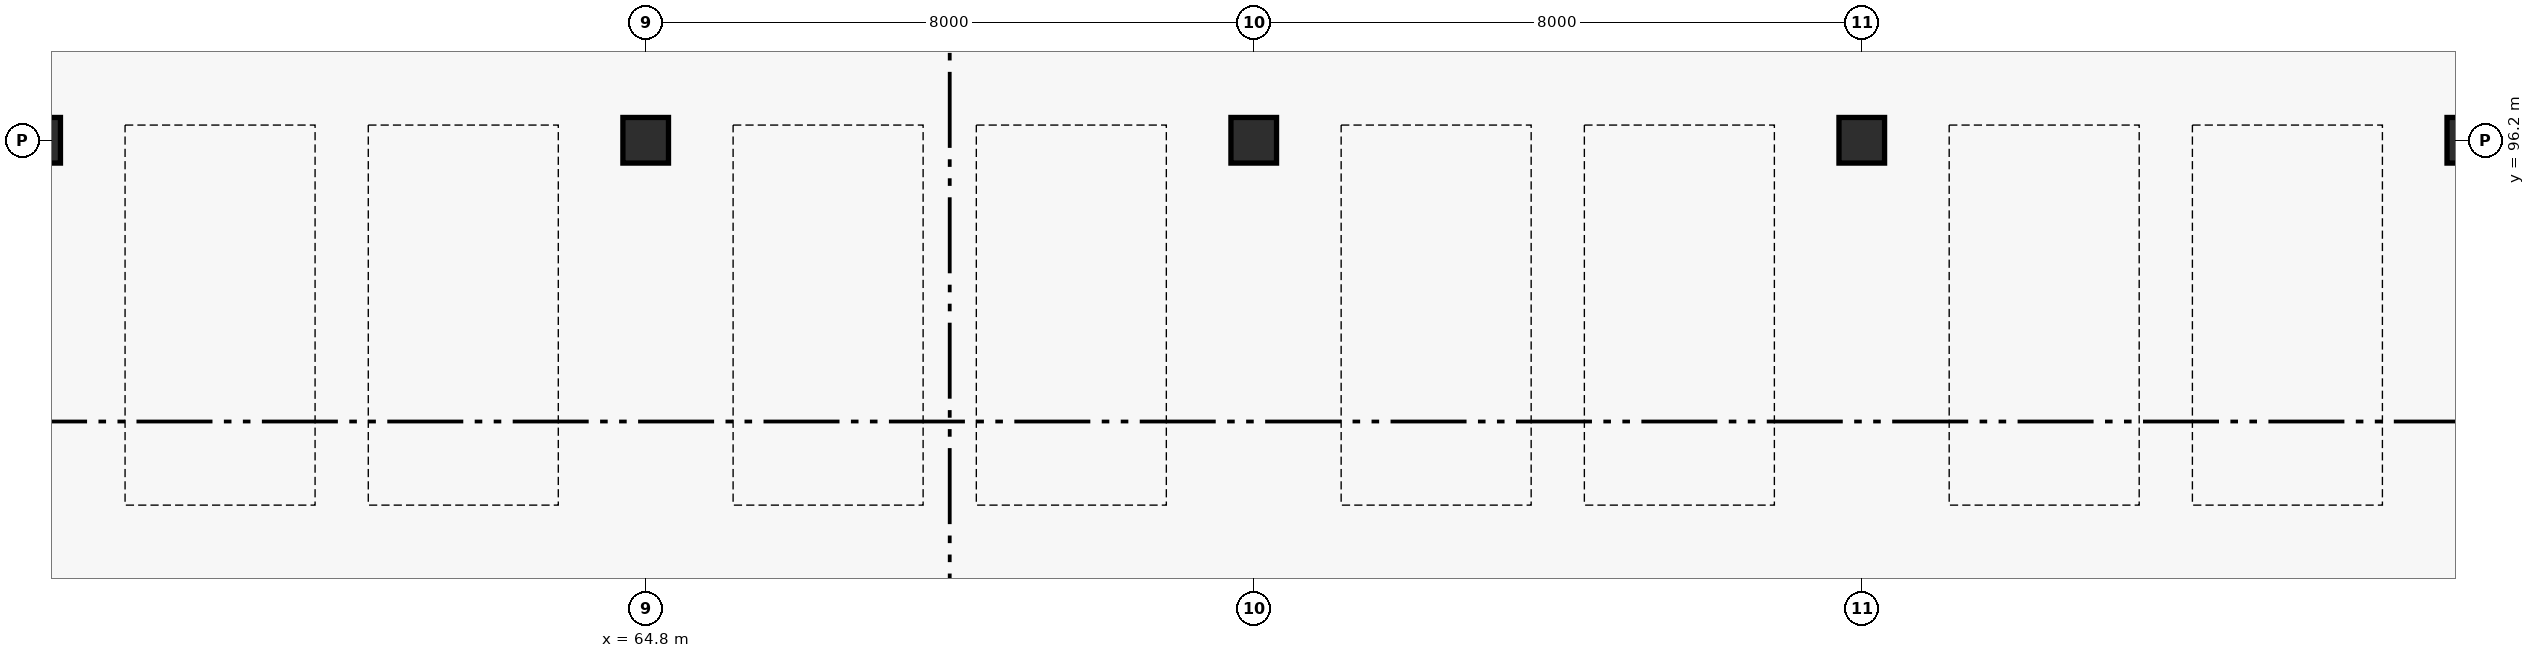
"""IFC4 building model, lengths in metres.
Left out: names, types, materials, properties, quantities, classifications, styles, units other than length and angle.
Written with IfcOpenShell. Run it as: python <this file> out.ifc"""

import sys

from ifc_helpers import new_model, si_unit, direction, frame, origin, origin_2d, place, context, subcontext, project, spatial, rectangle, extrude, element, save


model = new_model("IFC4")
c1 = context("Model", 3, precision=1e-05, world=origin(), true_north=direction((0.0, 1.0)))
c2 = subcontext(c1, "Body", "Model", "MODEL_VIEW")
j1 = project(units=[si_unit("LENGTHUNIT", "METRE"), si_unit("PLANEANGLEUNIT", "RADIAN")], contexts=[c1])
p1 = place(None, origin())
s1 = spatial("IfcSite", under=j1, at=p1, CompositionType="ELEMENT")
p2 = place(p1, origin())
s2 = spatial("IfcBuilding", under=s1, at=p2, CompositionType="ELEMENT")
p3 = place(p2, frame((0.0, 0.0, -4.8)))
s3 = spatial("IfcBuildingStorey", under=s2, at=p3, CompositionType="ELEMENT", Elevation=-4.8)
for number, where, z_axis, x_axis in (
    (1, (56.8, 96.2, 0.0), (0.0, 0.0, 1.0), (1.0, 0.0, 0.0)),
    (2, (64.8, 96.2, 0.0), (0.0, 0.0, 1.0), (1.0, 0.0, 0.0)),
    (3, (72.8, 96.2, 0.0), (0.0, 0.0, 1.0), (1.0, 0.0, 0.0)),
    (4, (80.8, 96.2, 0.0), (0.0, 0.0, 1.0), (1.0, 0.0, 0.0)),
    (5, (88.8, 96.2, 0.0), (0.0, 0.0, 1.0), (1.0, 0.0, 0.0)),
):
    element("IfcColumn", number, at=place(p3, frame(where, z_axis=z_axis, x_axis=x_axis)), inside=s3, PredefinedType="COLUMN", context=c2, shape_type="SweptSolid", body=[
        extrude(rectangle(XDim=0.6, YDim=0.6, at=origin_2d()), origin(), (0.0, 0.0, 1.0), 4.8),
    ])
save(model, sys.argv[1])
